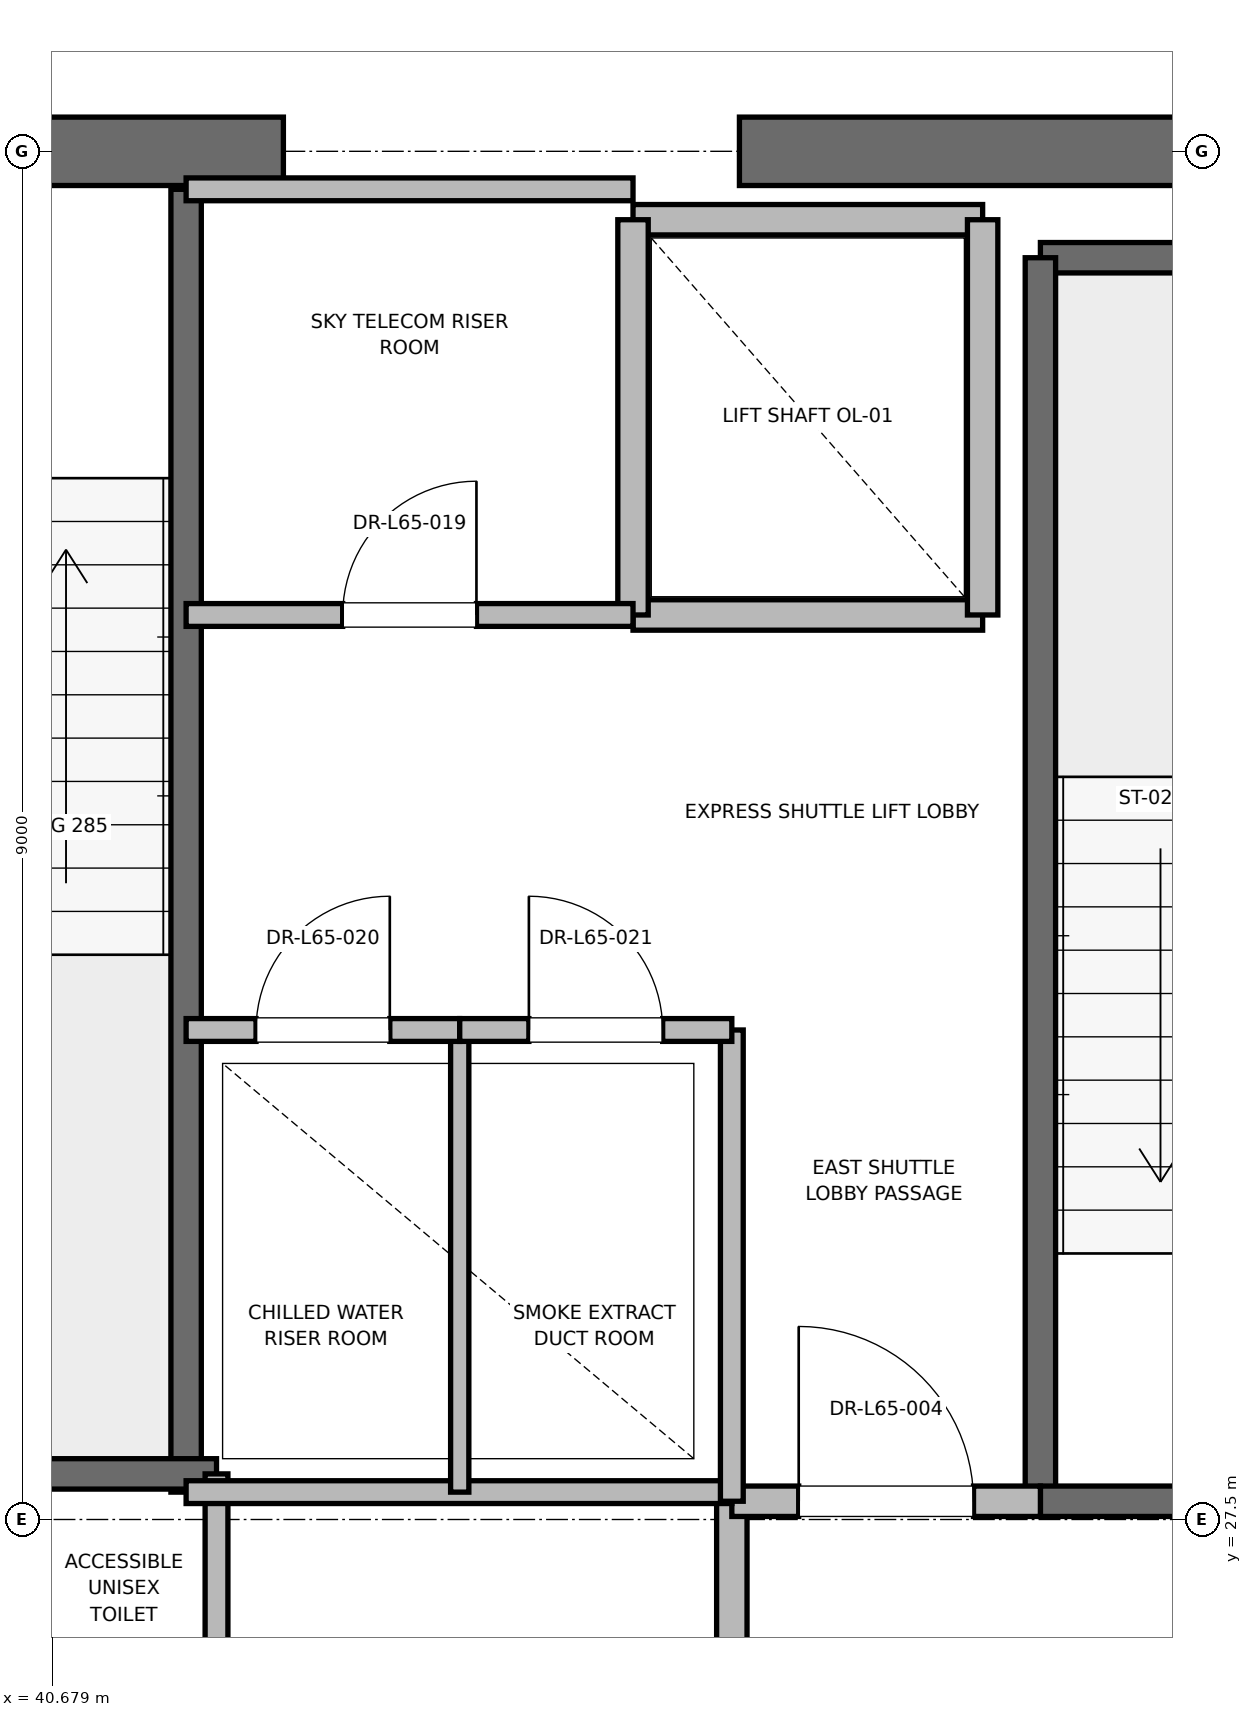
"""IFC4 building model, lengths in metres.
Left out: names, types, materials, properties, quantities, classifications, styles, units other than length and angle.
Written with IfcOpenShell. Run it as: python <this file> out.ifc"""

import sys

from ifc_helpers import new_model, si_unit, direction, frame, frame_2d, origin, place, context, subcontext, project, spatial, rectangle, extrude, element, fill, save


model = new_model("IFC4")
c1 = context("Model", 3, precision=1e-05, world=origin(), true_north=direction((0.0, 1.0)))
c2 = subcontext(c1, "Body", "Model", "MODEL_VIEW")
j1 = project(units=[si_unit("LENGTHUNIT", "METRE"), si_unit("PLANEANGLEUNIT", "RADIAN")], contexts=[c1])
p1 = place(None, origin())
s1 = spatial("IfcSite", under=j1, at=p1, CompositionType="ELEMENT")
p2 = place(p1, origin())
s2 = spatial("IfcBuilding", under=s1, at=p2, CompositionType="ELEMENT")
p3 = place(p2, frame((0.0, 0.0, 279.2)))
s3 = spatial("IfcBuildingStorey", under=s2, at=p3, CompositionType="ELEMENT", Elevation=279.2)
p4 = place(p3, frame((37.8, 36.5, 0.0), z_axis=(0.0, 0.0, 1.0), x_axis=(1.0, 0.0, 0.0)))
e1 = element("IfcWall", 1, at=p4, inside=s3, PredefinedType="SHEAR", context=c2, shape_type="SweptSolid", body=[
    extrude(rectangle(XDim=4.4, YDim=0.45, at=frame_2d((2.2, 0.0))), origin(), (0.0, 0.0, 1.0), 3.785),
])
p5 = place(p4, frame((1.65, 0.0, 0.0)))
e2 = element("IfcOpeningElement", 2, at=p5, cuts=e1, PredefinedType="OPENING", context=c2, shape_type="SweptSolid", body=[
    extrude(rectangle(XDim=1.1, YDim=2.15, at=frame_2d((0.55, 1.075))), frame((0.0, 0.225, 0.0), z_axis=(0.0, -1.0, 0.0), x_axis=(1.0, 0.0, 0.0)), (0.0, 0.0, 1.0), 0.45),
])
p6 = place(p3, frame((45.2, 36.5, 0.0), z_axis=(0.0, 0.0, 1.0), x_axis=(1.0, 0.0, 0.0)))
e3 = element("IfcWall", 3, at=p6, inside=s3, PredefinedType="SHEAR", context=c2, shape_type="SweptSolid", body=[
    extrude(rectangle(XDim=5.8, YDim=0.45, at=frame_2d((2.9, 0.0))), origin(), (0.0, 0.0, 1.0), 3.785),
])
p7 = place(p3, frame((47.18, 35.8, 0.0), z_axis=(0.0, 0.0, 1.0), x_axis=(1.0, 0.0, 0.0)))
e4 = element("IfcWall", 4, at=p7, inside=s3, PredefinedType="SOLIDWALL", context=c2, shape_type="SweptSolid", body=[
    extrude(rectangle(XDim=3.12, YDim=0.2, at=frame_2d((1.56, 0.0))), origin(), (0.0, 0.0, 1.0), 3.785),
])
p8 = place(p3, frame((47.18, 27.62, 0.0), z_axis=(0.0, 0.0, 1.0), x_axis=(0.0, 1.0, 0.0)))
e5 = element("IfcWall", 5, at=p8, inside=s3, PredefinedType="SOLIDWALL", context=c2, shape_type="SweptSolid", body=[
    extrude(rectangle(XDim=8.18, YDim=0.2, at=frame_2d((4.09, 0.0))), origin(), (0.0, 0.0, 1.0), 3.785),
])
p9 = place(p3, frame((47.18, 27.62, 0.0), z_axis=(0.0, 0.0, 1.0), x_axis=(1.0, 0.0, 0.0)))
e6 = element("IfcWall", 6, at=p9, inside=s3, PredefinedType="SOLIDWALL", context=c2, shape_type="SweptSolid", body=[
    extrude(rectangle(XDim=3.12, YDim=0.2, at=frame_2d((1.56, 0.0))), origin(), (0.0, 0.0, 1.0), 3.785),
])
p10 = place(p9, frame((1.01, 0.0, 0.0)))
e7 = element("IfcOpeningElement", 7, at=p10, cuts=e6, PredefinedType="OPENING", context=c2, shape_type="SweptSolid", body=[
    extrude(rectangle(XDim=1.1, YDim=2.15, at=frame_2d((0.55, 1.075))), frame((0.0, 0.1, 0.0), z_axis=(0.0, -1.0, 0.0), x_axis=(1.0, 0.0, 0.0)), (0.0, 0.0, 1.0), 0.2),
])
p11 = place(p3, frame((41.56, 27.68, 0.0), z_axis=(0.0, 0.0, 1.0), x_axis=(0.0, 1.0, 0.0)))
e8 = element("IfcWall", 8, at=p11, inside=s3, PredefinedType="SOLIDWALL", context=c2, shape_type="SweptSolid", body=[
    extrude(rectangle(XDim=8.57, YDim=0.2, at=frame_2d((4.285, 0.0))), origin(), (0.0, 0.0, 1.0), 3.785),
])
p12 = place(p3, frame((38.44, 27.8, 0.0), z_axis=(0.0, 0.0, 1.0), x_axis=(1.0, 0.0, 0.0)))
e9 = element("IfcWall", 9, at=p12, inside=s3, PredefinedType="SOLIDWALL", context=c2, shape_type="SweptSolid", body=[
    extrude(rectangle(XDim=3.32, YDim=0.2, at=frame_2d((1.66, 0.0))), origin(), (0.0, 0.0, 1.0), 3.785),
])
p13 = place(p3, frame((45.15, 24.25, 0.0), z_axis=(0.0, 0.0, 1.0), x_axis=(0.0, 1.0, 0.0)))
e10 = element("IfcWall", 10, at=p13, inside=s3, PredefinedType="PARTITIONING", context=c2, shape_type="SweptSolid", body=[
    extrude(rectangle(XDim=3.37, YDim=0.2, at=frame_2d((1.685, 0.0))), origin(), (0.0, 0.0, 1.0), 3.785),
])
p14 = place(p3, frame((45.15, 27.62, 0.0), z_axis=(0.0, 0.0, 1.0), x_axis=(1.0, 0.0, 0.0)))
e11 = element("IfcWall", 11, at=p14, inside=s3, PredefinedType="PARTITIONING", context=c2, shape_type="SweptSolid", body=[
    extrude(rectangle(XDim=2.03, YDim=0.2, at=frame_2d((1.015, 0.0))), origin(), (0.0, 0.0, 1.0), 3.785),
])
p15 = place(p14, frame((0.44, 0.0, 0.0)))
e12 = element("IfcOpeningElement", 12, at=p15, cuts=e11, PredefinedType="OPENING", context=c2, shape_type="SweptSolid", body=[
    extrude(rectangle(XDim=1.15, YDim=2.2, at=frame_2d((0.575, 1.1))), frame((0.0, 0.1, 0.0), z_axis=(0.0, -1.0, 0.0), x_axis=(1.0, 0.0, 0.0)), (0.0, 0.0, 1.0), 0.2),
])
p16 = place(p3, frame((44.5, 33.45, 0.0), z_axis=(0.0, 0.0, 1.0), x_axis=(1.0, 0.0, 0.0)))
e13 = element("IfcWall", 13, at=p16, inside=s3, PredefinedType="SOLIDWALL", context=c2, shape_type="SweptSolid", body=[
    extrude(rectangle(XDim=2.3, YDim=0.2, at=frame_2d((1.15, 0.0))), origin(), (0.0, 0.0, 1.0), 3.785),
])
p17 = place(p3, frame((46.8, 36.05, 0.0), z_axis=(0.0, 0.0, 1.0), x_axis=(-1.0, 0.0, 0.0)))
e14 = element("IfcWall", 14, at=p17, inside=s3, PredefinedType="SOLIDWALL", context=c2, shape_type="SweptSolid", body=[
    extrude(rectangle(XDim=2.3, YDim=0.2, at=frame_2d((1.15, 0.0))), origin(), (0.0, 0.0, 1.0), 2.865),
])
p18 = place(p3, frame((44.5, 36.05, 0.0), z_axis=(0.0, 0.0, 1.0), x_axis=(0.0, -1.0, 0.0)))
e15 = element("IfcWall", 15, at=p18, inside=s3, PredefinedType="SOLIDWALL", context=c2, shape_type="SweptSolid", body=[
    extrude(rectangle(XDim=2.6, YDim=0.2, at=frame_2d((1.3, 0.0))), origin(), (0.0, 0.0, 1.0), 2.865),
])
p19 = place(p3, frame((46.8, 33.45, 0.0), z_axis=(0.0, 0.0, 1.0), x_axis=(0.0, 1.0, 0.0)))
e16 = element("IfcWall", 16, at=p19, inside=s3, PredefinedType="SOLIDWALL", context=c2, shape_type="SweptSolid", body=[
    extrude(rectangle(XDim=2.6, YDim=0.2, at=frame_2d((1.3, 0.0))), origin(), (0.0, 0.0, 1.0), 3.785),
])
p20 = place(p3, frame((41.76, 23.8, 0.0), z_axis=(0.0, 0.0, 1.0), x_axis=(0.0, 1.0, 0.0)))
e17 = element("IfcWall", 17, at=p20, inside=s3, PredefinedType="PARTITIONING", context=c2, shape_type="SweptSolid", body=[
    extrude(rectangle(XDim=4.0, YDim=0.15, at=frame_2d((2.0, 0.0))), origin(), (0.0, 0.0, 1.0), 2.85),
])
p21 = place(p3, frame((41.56, 27.68, 0.0), z_axis=(0.0, 0.0, 1.0), x_axis=(1.0, 0.0, 0.0)))
e18 = element("IfcWall", 18, at=p21, inside=s3, PredefinedType="PARTITIONING", context=c2, shape_type="SweptSolid", body=[
    extrude(rectangle(XDim=3.59, YDim=0.15, at=frame_2d((1.795, 0.0))), origin(), (0.0, 0.0, 1.0), 2.85),
])
p22 = place(p3, frame((45.15, 27.62, 0.0), z_axis=(0.0, 0.0, 1.0), x_axis=(0.0, 1.0, 0.0)))
e19 = element("IfcWall", 19, at=p22, inside=s3, PredefinedType="PARTITIONING", context=c2, shape_type="SweptSolid", body=[
    extrude(rectangle(XDim=3.1, YDim=0.15, at=frame_2d((1.55, 0.0))), origin(), (0.0, 0.0, 1.0), 2.85),
])
p23 = place(p3, frame((43.36, 27.68, 0.0), z_axis=(0.0, 0.0, 1.0), x_axis=(0.0, 1.0, 0.0)))
e20 = element("IfcWall", 20, at=p23, inside=s3, PredefinedType="PARTITIONING", context=c2, shape_type="SweptSolid", body=[
    extrude(rectangle(XDim=3.04, YDim=0.12, at=frame_2d((1.52, 0.0))), origin(), (0.0, 0.0, 1.0), 2.85),
])
p24 = place(p3, frame((41.56, 30.72, 0.0), z_axis=(0.0, 0.0, 1.0), x_axis=(1.0, 0.0, 0.0)))
e21 = element("IfcWall", 21, at=p24, inside=s3, PredefinedType="PARTITIONING", context=c2, shape_type="SweptSolid", body=[
    extrude(rectangle(XDim=1.8, YDim=0.15, at=frame_2d((0.9, 0.0))), origin(), (0.0, 0.0, 1.0), 2.85),
])
p25 = place(p24, frame((0.46, 0.0, 0.0)))
e22 = element("IfcOpeningElement", 22, at=p25, cuts=e21, PredefinedType="OPENING", context=c2, shape_type="SweptSolid", body=[
    extrude(rectangle(XDim=0.88, YDim=2.1, at=frame_2d((0.44, 1.05))), frame((0.0, 0.075, 0.0), z_axis=(0.0, -1.0, 0.0), x_axis=(1.0, 0.0, 0.0)), (0.0, 0.0, 1.0), 0.15),
])
p26 = place(p3, frame((43.36, 30.72, 0.0), z_axis=(0.0, 0.0, 1.0), x_axis=(1.0, 0.0, 0.0)))
e23 = element("IfcWall", 23, at=p26, inside=s3, PredefinedType="PARTITIONING", context=c2, shape_type="SweptSolid", body=[
    extrude(rectangle(XDim=1.79, YDim=0.15, at=frame_2d((0.895, 0.0))), origin(), (0.0, 0.0, 1.0), 2.85),
])
p27 = place(p26, frame((0.455, 0.0, 0.0)))
e24 = element("IfcOpeningElement", 24, at=p27, cuts=e23, PredefinedType="OPENING", context=c2, shape_type="SweptSolid", body=[
    extrude(rectangle(XDim=0.88, YDim=2.1, at=frame_2d((0.44, 1.05))), frame((0.0, 0.075, 0.0), z_axis=(0.0, -1.0, 0.0), x_axis=(1.0, 0.0, 0.0)), (0.0, 0.0, 1.0), 0.15),
])
p28 = place(p3, frame((41.56, 36.25, 0.0), z_axis=(0.0, 0.0, 1.0), x_axis=(1.0, 0.0, 0.0)))
e25 = element("IfcWall", 25, at=p28, inside=s3, PredefinedType="PARTITIONING", context=c2, shape_type="SweptSolid", body=[
    extrude(rectangle(XDim=2.94, YDim=0.15, at=frame_2d((1.47, 0.0))), origin(), (0.0, 0.0, 1.0), 2.85),
])
p29 = place(p3, frame((41.56, 33.45, 0.0), z_axis=(0.0, 0.0, 1.0), x_axis=(1.0, 0.0, 0.0)))
e26 = element("IfcWall", 26, at=p29, inside=s3, PredefinedType="PARTITIONING", context=c2, shape_type="SweptSolid", body=[
    extrude(rectangle(XDim=2.94, YDim=0.15, at=frame_2d((1.47, 0.0))), origin(), (0.0, 0.0, 1.0), 2.85),
])
p30 = place(p29, frame((1.03, 0.0, 0.0)))
e27 = element("IfcOpeningElement", 27, at=p30, cuts=e26, PredefinedType="OPENING", context=c2, shape_type="SweptSolid", body=[
    extrude(rectangle(XDim=0.88, YDim=2.1, at=frame_2d((0.44, 1.05))), frame((0.0, 0.075, 0.0), z_axis=(0.0, -1.0, 0.0), x_axis=(1.0, 0.0, 0.0)), (0.0, 0.0, 1.0), 0.15),
])
p31 = place(p15, origin())
e28 = element("IfcDoor", 28, at=p31, inside=s3, OperationType="SINGLE_SWING_LEFT", PredefinedType="DOOR", context=c2, shape_type="SweptSolid", body=[
    extrude(rectangle(XDim=1.15, YDim=2.2, at=frame_2d((0.575, 1.1))), frame((0.0, 0.025, 0.0), z_axis=(0.0, -1.0, 0.0), x_axis=(1.0, 0.0, 0.0)), (0.0, 0.0, 1.0), 0.05),
])
fill(e12, e28)
p32 = place(p25, origin())
e29 = element("IfcDoor", 29, at=p32, inside=s3, OperationType="SINGLE_SWING_RIGHT", PredefinedType="DOOR", context=c2, shape_type="SweptSolid", body=[
    extrude(rectangle(XDim=0.88, YDim=2.1, at=frame_2d((0.44, 1.05))), frame((0.0, 0.025, 0.0), z_axis=(0.0, -1.0, 0.0), x_axis=(1.0, 0.0, 0.0)), (0.0, 0.0, 1.0), 0.05),
])
fill(e22, e29)
p33 = place(p27, origin())
e30 = element("IfcDoor", 30, at=p33, inside=s3, OperationType="SINGLE_SWING_LEFT", PredefinedType="DOOR", context=c2, shape_type="SweptSolid", body=[
    extrude(rectangle(XDim=0.88, YDim=2.1, at=frame_2d((0.44, 1.05))), frame((0.0, 0.025, 0.0), z_axis=(0.0, -1.0, 0.0), x_axis=(1.0, 0.0, 0.0)), (0.0, 0.0, 1.0), 0.05),
])
fill(e24, e30)
p34 = place(p30, origin())
e31 = element("IfcDoor", 31, at=p34, inside=s3, OperationType="SINGLE_SWING_RIGHT", PredefinedType="DOOR", context=c2, shape_type="SweptSolid", body=[
    extrude(rectangle(XDim=0.88, YDim=2.1, at=frame_2d((0.44, 1.05))), frame((0.0, 0.025, 0.0), z_axis=(0.0, -1.0, 0.0), x_axis=(1.0, 0.0, 0.0)), (0.0, 0.0, 1.0), 0.05),
])
fill(e27, e31)
save(model, sys.argv[1])
